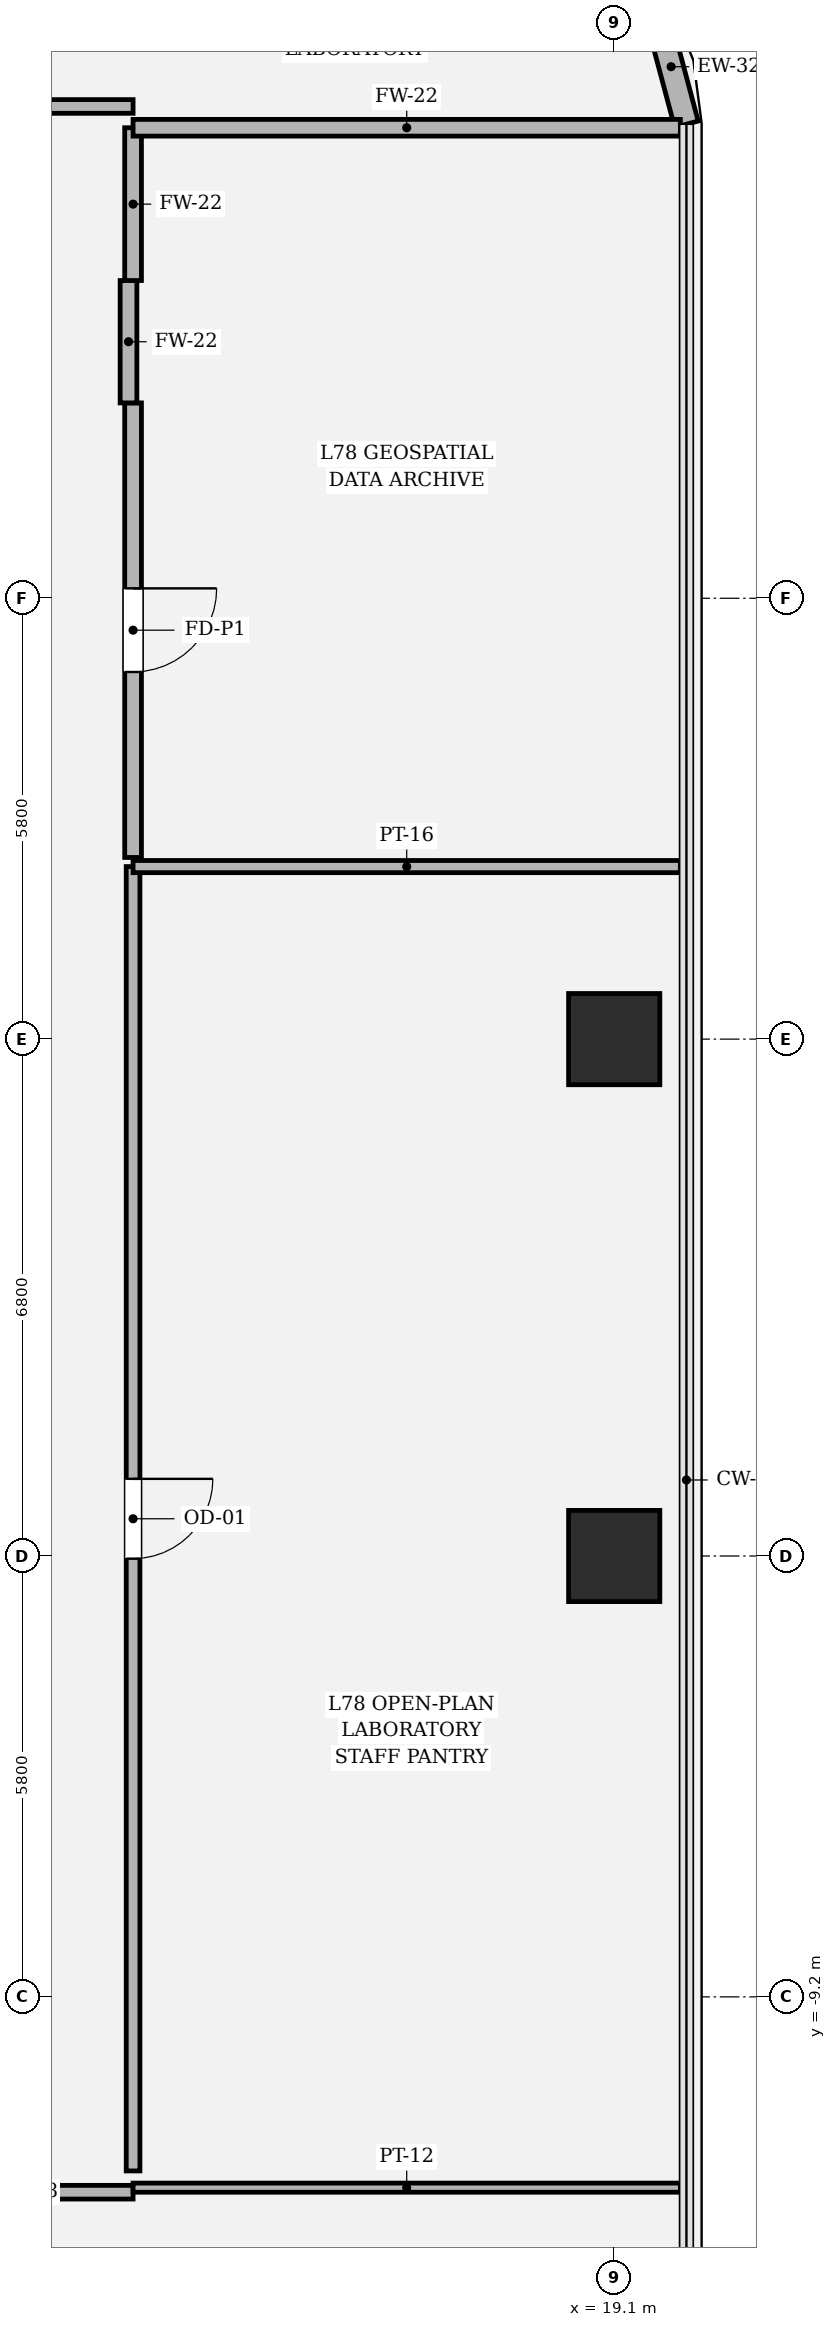
"""IFC4 building model, lengths in metres.
Left out: names, types, materials, properties, quantities, classifications, styles, units other than length and angle.
Written with IfcOpenShell. Run it as: python <this file> out.ifc"""

import sys

from ifc_helpers import new_model, si_unit, direction, frame, frame_2d, origin, origin_2d, place, context, subcontext, project, spatial, rectangle, hollow_rectangle, extrude, element, fill, save


model = new_model("IFC4")
c1 = context("Model", 3, precision=1e-05, world=origin(), true_north=direction((0.0, 1.0)))
c2 = subcontext(c1, "Body", "Model", "MODEL_VIEW")
j1 = project(units=[si_unit("LENGTHUNIT", "METRE"), si_unit("PLANEANGLEUNIT", "RADIAN")], contexts=[c1])
p1 = place(None, origin())
s1 = spatial("IfcSite", under=j1, at=p1, CompositionType="ELEMENT")
p2 = place(p1, origin())
s2 = spatial("IfcBuilding", under=s1, at=p2, CompositionType="ELEMENT")
p3 = place(p2, frame((0.0, 0.0, 330.0)))
s3 = spatial("IfcBuildingStorey", under=s2, at=p3, CompositionType="ELEMENT", Elevation=330.0)
for number, where, z_axis, x_axis in (
    (1, (19.1, -3.4, 0.0), (0.0, 0.0, 1.0), (1.0, 0.0, 0.0)),
    (2, (19.1, 3.4, 0.0), (0.0, 0.0, 1.0), (1.0, 0.0, 0.0)),
):
    element("IfcColumn", number, at=place(p3, frame(where, z_axis=z_axis, x_axis=x_axis)), inside=s3, PredefinedType="COLUMN", context=c2, shape_type="SweptSolid", body=[
        extrude(hollow_rectangle(XDim=1.2, YDim=1.2, WallThickness=0.035, at=origin_2d()), origin(), (0.0, 0.0, 1.0), 4.2),
    ])
p4 = place(p3, frame((20.05, 15.437, 0.0), z_axis=(0.0, 0.0, 1.0), x_axis=(-0.257847112249, 0.966185730957, 0.0)))
e3 = element("IfcWall", 3, at=p4, inside=s3, PredefinedType="SOLIDWALL", context=c2, shape_type="SweptSolid", body=[
    extrude(rectangle(XDim=1.565, YDim=0.32, at=frame_2d((0.783, 0.0))), origin(), (0.0, 0.0, 1.0), 3.94),
])
p5 = place(p3, frame((8.772, -11.77, 0.0), z_axis=(0.0, 0.0, 1.0), x_axis=(1.0, 0.0, 0.0)))
e4 = element("IfcWall", 4, at=p5, inside=s3, PredefinedType="PARTITIONING", context=c2, shape_type="SweptSolid", body=[
    extrude(rectangle(XDim=3.998, YDim=0.18, at=frame_2d((1.999, 0.0))), origin(), (0.0, 0.0, 1.0), 2.614),
])
p6 = place(p5, frame((1.474, 0.0, 0.0)))
e5 = element("IfcOpeningElement", 5, at=p6, cuts=e4, PredefinedType="OPENING", context=c2, shape_type="SweptSolid", body=[
    extrude(rectangle(XDim=1.05, YDim=2.2, at=frame_2d((0.525, 1.1))), frame((0.0, 0.1, 0.0), z_axis=(0.0, -1.0, 0.0), x_axis=(1.0, 0.0, 0.0)), (0.0, 0.0, 1.0), 0.2),
])
p7 = place(p3, frame((12.77, -11.71, 0.0), z_axis=(0.0, 0.0, 1.0), x_axis=(1.0, 0.0, 0.0)))
e6 = element("IfcWall", 6, at=p7, inside=s3, PredefinedType="PARTITIONING", context=c2, shape_type="SweptSolid", body=[
    extrude(rectangle(XDim=7.2, YDim=0.12, at=frame_2d((3.6, 0.0))), origin(), (0.0, 0.0, 1.0), 2.614),
])
p8 = place(p3, frame((12.77, -11.49, 0.0), z_axis=(0.0, 0.0, 1.0), x_axis=(0.0, 1.0, 0.0)))
e7 = element("IfcWall", 7, at=p8, inside=s3, PredefinedType="PARTITIONING", context=c2, shape_type="SweptSolid", body=[
    extrude(rectangle(XDim=17.16, YDim=0.18, at=frame_2d((8.58, 0.0))), origin(), (0.0, 0.0, 1.0), 2.614),
])
p9 = place(p8, frame((8.055, 0.0, 0.0)))
e8 = element("IfcOpeningElement", 8, at=p9, cuts=e7, PredefinedType="OPENING", context=c2, shape_type="SweptSolid", body=[
    extrude(rectangle(XDim=1.05, YDim=2.2, at=frame_2d((0.525, 1.1))), frame((0.0, 0.1, 0.0), z_axis=(0.0, -1.0, 0.0), x_axis=(1.0, 0.0, 0.0)), (0.0, 0.0, 1.0), 0.2),
])
p10 = place(p3, frame((12.77, 5.67, 0.0), z_axis=(0.0, 0.0, 1.0), x_axis=(1.0, 0.0, 0.0)))
e9 = element("IfcWall", 9, at=p10, inside=s3, PredefinedType="PARTITIONING", context=c2, shape_type="SweptSolid", body=[
    extrude(rectangle(XDim=7.2, YDim=0.16, at=frame_2d((3.6, 0.0))), origin(), (0.0, 0.0, 1.0), 2.614),
])
p11 = place(p3, frame((12.77, 5.79, 0.0), z_axis=(0.0, 0.0, 1.0), x_axis=(0.0, 1.0, 0.0)))
e10 = element("IfcWall", 10, at=p11, inside=s3, PredefinedType="SOLIDWALL", context=c2, shape_type="SweptSolid", body=[
    extrude(rectangle(XDim=5.98, YDim=0.22, at=frame_2d((2.99, 0.0))), origin(), (0.0, 0.0, 1.0), 2.614),
])
p12 = place(p11, frame((2.44, 0.0, 0.0)))
e11 = element("IfcOpeningElement", 11, at=p12, cuts=e10, PredefinedType="OPENING", context=c2, shape_type="SweptSolid", body=[
    extrude(rectangle(XDim=1.1, YDim=2.2, at=frame_2d((0.55, 1.1))), frame((0.0, 0.12, 0.0), z_axis=(0.0, -1.0, 0.0), x_axis=(1.0, 0.0, 0.0)), (0.0, 0.0, 1.0), 0.24),
])
p13 = place(p3, frame((12.71, 11.77, 0.0), z_axis=(0.0, 0.0, 1.0), x_axis=(0.0, 1.0, 0.0)))
e12 = element("IfcWall", 12, at=p13, inside=s3, PredefinedType="SOLIDWALL", context=c2, shape_type="SweptSolid", body=[
    extrude(rectangle(XDim=1.61, YDim=0.22, at=frame_2d((0.805, 0.0))), origin(), (0.0, 0.0, 1.0), 3.574),
])
p14 = place(p3, frame((12.77, 13.38, 0.0), z_axis=(0.0, 0.0, 1.0), x_axis=(0.0, 1.0, 0.0)))
e13 = element("IfcWall", 13, at=p14, inside=s3, PredefinedType="SOLIDWALL", context=c2, shape_type="SweptSolid", body=[
    extrude(rectangle(XDim=2.01, YDim=0.22, at=frame_2d((1.005, 0.0))), origin(), (0.0, 0.0, 1.0), 3.574),
])
p15 = place(p3, frame((12.77, 15.39, 0.0), z_axis=(0.0, 0.0, 1.0), x_axis=(1.0, 0.0, 0.0)))
e14 = element("IfcWall", 14, at=p15, inside=s3, PredefinedType="SOLIDWALL", context=c2, shape_type="SweptSolid", body=[
    extrude(rectangle(XDim=7.2, YDim=0.22, at=frame_2d((3.6, 0.0))), origin(), (0.0, 0.0, 1.0), 2.614),
])
p16 = place(p3, frame((12.77, 15.67, 0.0), z_axis=(0.0, 0.0, 1.0), x_axis=(-1.0, 0.0, 0.0)))
e15 = element("IfcWall", 15, at=p16, inside=s3, PredefinedType="PARTITIONING", context=c2, shape_type="SweptSolid", body=[
    extrude(rectangle(XDim=20.17, YDim=0.18, at=frame_2d((10.085, 0.0))), origin(), (0.0, 0.0, 1.0), 2.614),
])
p17 = place(p16, frame((6.86, 0.0, 0.0)))
e16 = element("IfcOpeningElement", 16, at=p17, cuts=e15, PredefinedType="OPENING", context=c2, shape_type="SweptSolid", body=[
    extrude(rectangle(XDim=1.05, YDim=2.2, at=frame_2d((0.525, 1.1))), frame((0.0, 0.1, 0.0), z_axis=(0.0, -1.0, 0.0), x_axis=(1.0, 0.0, 0.0)), (0.0, 0.0, 1.0), 0.2),
])
p18 = place(p9, origin())
e17 = element("IfcDoor", 17, at=p18, inside=s3, OperationType="SINGLE_SWING_RIGHT", PredefinedType="DOOR", context=c2, shape_type="SweptSolid", body=[
    extrude(rectangle(XDim=1.05, YDim=2.2, at=frame_2d((0.525, 1.1))), frame((0.0, 0.025, 0.0), z_axis=(0.0, -1.0, 0.0), x_axis=(1.0, 0.0, 0.0)), (0.0, 0.0, 1.0), 0.05),
])
fill(e8, e17)
p19 = place(p12, origin())
e18 = element("IfcDoor", 18, at=p19, inside=s3, OperationType="SINGLE_SWING_RIGHT", PredefinedType="DOOR", context=c2, shape_type="SweptSolid", body=[
    extrude(rectangle(XDim=1.1, YDim=2.2, at=frame_2d((0.55, 1.1))), frame((0.0, 0.025, 0.0), z_axis=(0.0, -1.0, 0.0), x_axis=(1.0, 0.0, 0.0)), (0.0, 0.0, 1.0), 0.05),
])
fill(e11, e18)
save(model, sys.argv[1])
